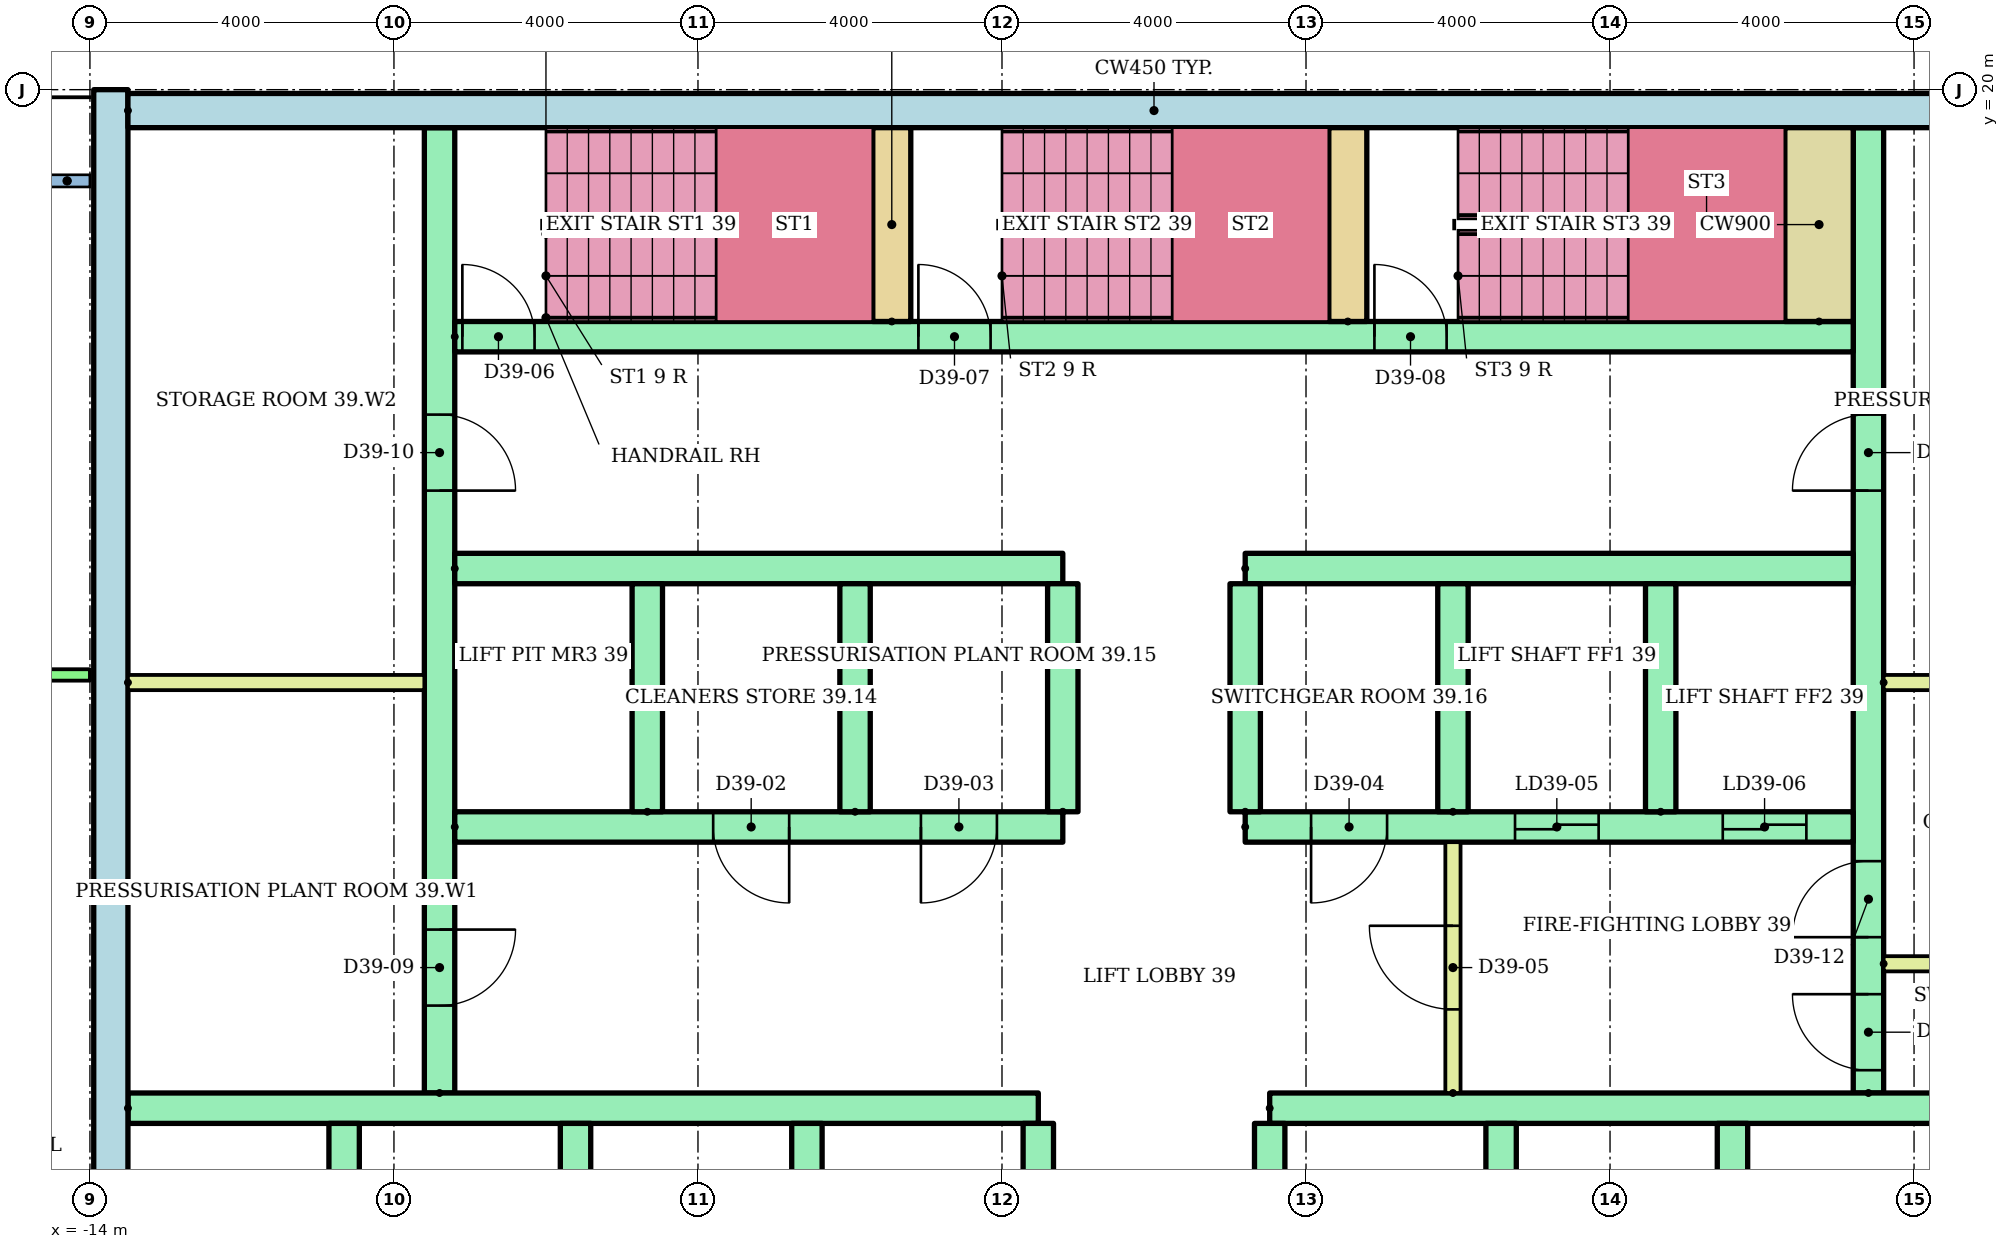
"""IFC4 building model, lengths in metres.
Left out: names, types, materials, properties, quantities, classifications, styles, units other than length and angle.
Written with IfcOpenShell. Run it as: python <this file> out.ifc"""

import sys

from ifc_helpers import new_model, si_unit, direction, frame, frame_2d, origin, place, context, subcontext, project, spatial, rectangle, extrude, element, fill, save


model = new_model("IFC4")
c1 = context("Model", 3, precision=1e-05, world=origin(), true_north=direction((0.0, 1.0)))
c2 = subcontext(c1, "Body", "Model", "MODEL_VIEW")
j1 = project(units=[si_unit("LENGTHUNIT", "METRE"), si_unit("PLANEANGLEUNIT", "RADIAN")], contexts=[c1])
p1 = place(None, origin())
s1 = spatial("IfcSite", under=j1, at=p1, CompositionType="ELEMENT")
p2 = place(p1, origin())
s2 = spatial("IfcBuilding", under=s1, at=p2, CompositionType="ELEMENT")
p3 = place(p2, frame((0.0, 0.0, 148.6)))
s3 = spatial("IfcBuildingStorey", under=s2, at=p3, CompositionType="ELEMENT", Elevation=148.6)
p4 = place(p3, frame((-13.725, 3.0, 0.0), z_axis=(0.0, 0.0, 1.0), x_axis=(0.0, 1.0, 0.0)))
e1 = element("IfcWall", 1, at=p4, inside=s3, PredefinedType="SHEAR", context=c2, shape_type="SweptSolid", body=[
    extrude(rectangle(XDim=17.0, YDim=0.45, at=frame_2d((8.5, 0.0))), origin(), (0.0, 0.0, 1.0), 2.8),
])
p5 = place(p3, frame((-13.5, 19.725, 0.0)))
e2 = element("IfcWall", 2, at=p5, inside=s3, PredefinedType="SHEAR", context=c2, shape_type="SweptSolid", body=[
    extrude(rectangle(XDim=27.0, YDim=0.45, at=frame_2d((13.5, 0.0))), origin(), (0.0, 0.0, 1.0), 2.8),
])
p6 = place(p3, frame((-9.4, 6.8, 0.0), z_axis=(0.0, 0.0, 1.0), x_axis=(0.0, 1.0, 0.0)))
e3 = element("IfcWall", 3, at=p6, inside=s3, PredefinedType="SHEAR", context=c2, shape_type="SweptSolid", body=[
    extrude(rectangle(XDim=12.7, YDim=0.4, at=frame_2d((6.35, 0.0))), origin(), (0.0, 0.0, 1.0), 2.8),
])
p7 = place(p6, frame((1.15, 0.0, 0.0)))
e4 = element("IfcOpeningElement", 4, at=p7, cuts=e3, PredefinedType="OPENING", context=c2, shape_type="SweptSolid", body=[
    extrude(rectangle(XDim=1.0, YDim=2.1, at=frame_2d((0.5, 1.05))), frame((0.0, 0.21, 0.0), z_axis=(0.0, -1.0, 0.0), x_axis=(1.0, 0.0, 0.0)), (0.0, 0.0, 1.0), 0.42),
])
p8 = place(p6, frame((7.925, 0.0, 0.0)))
e5 = element("IfcOpeningElement", 5, at=p8, cuts=e3, PredefinedType="OPENING", context=c2, shape_type="SweptSolid", body=[
    extrude(rectangle(XDim=1.0, YDim=2.1, at=frame_2d((0.5, 1.05))), frame((0.0, 0.21, 0.0), z_axis=(0.0, -1.0, 0.0), x_axis=(1.0, 0.0, 0.0)), (0.0, 0.0, 1.0), 0.42),
])
p9 = place(p3, frame((9.4, 6.8, 0.0), z_axis=(0.0, 0.0, 1.0), x_axis=(0.0, 1.0, 0.0)))
e6 = element("IfcWall", 6, at=p9, inside=s3, PredefinedType="SHEAR", context=c2, shape_type="SweptSolid", body=[
    extrude(rectangle(XDim=12.7, YDim=0.4, at=frame_2d((6.35, 0.0))), origin(), (0.0, 0.0, 1.0), 2.8),
])
p10 = place(p9, frame((0.3, 0.0, 0.0)))
e7 = element("IfcOpeningElement", 7, at=p10, cuts=e6, PredefinedType="OPENING", context=c2, shape_type="SweptSolid", body=[
    extrude(rectangle(XDim=1.0, YDim=2.1, at=frame_2d((0.5, 1.05))), frame((0.0, 0.21, 0.0), z_axis=(0.0, -1.0, 0.0), x_axis=(1.0, 0.0, 0.0)), (0.0, 0.0, 1.0), 0.42),
])
p11 = place(p9, frame((2.05, 0.0, 0.0)))
e8 = element("IfcOpeningElement", 8, at=p11, cuts=e6, PredefinedType="OPENING", context=c2, shape_type="SweptSolid", body=[
    extrude(rectangle(XDim=1.0, YDim=2.1, at=frame_2d((0.5, 1.05))), frame((0.0, 0.21, 0.0), z_axis=(0.0, -1.0, 0.0), x_axis=(1.0, 0.0, 0.0)), (0.0, 0.0, 1.0), 0.42),
])
p12 = place(p9, frame((7.925, 0.0, 0.0)))
e9 = element("IfcOpeningElement", 9, at=p12, cuts=e6, PredefinedType="OPENING", context=c2, shape_type="SweptSolid", body=[
    extrude(rectangle(XDim=1.0, YDim=2.1, at=frame_2d((0.5, 1.05))), frame((0.0, 0.21, 0.0), z_axis=(0.0, -1.0, 0.0), x_axis=(1.0, 0.0, 0.0)), (0.0, 0.0, 1.0), 0.42),
])
for number, where in (
    (10, (-13.5, 6.6, 0.0)),
    (11, (1.522, 6.6, 0.0)),
):
    element("IfcWall", number, at=place(p3, frame(where)), inside=s3, PredefinedType="SHEAR", context=c2, shape_type="SweptSolid", body=[
        extrude(rectangle(XDim=11.978, YDim=0.4, at=frame_2d((5.989, 0.0))), origin(), (0.0, 0.0, 1.0), 2.8),
    ])
for number, where, z_axis, x_axis in (
    (12, (-10.656, 3.4, 0.0), (0.0, 0.0, 1.0), (0.0, 1.0, 0.0)),
    (13, (-7.611, 3.4, 0.0), (0.0, 0.0, 1.0), (0.0, 1.0, 0.0)),
    (14, (-4.567, 3.4, 0.0), (0.0, 0.0, 1.0), (0.0, 1.0, 0.0)),
    (15, (-1.522, 3.4, 0.0), (0.0, 0.0, 1.0), (0.0, 1.0, 0.0)),
    (16, (1.522, 3.4, 0.0), (0.0, 0.0, 1.0), (0.0, 1.0, 0.0)),
    (17, (4.567, 3.4, 0.0), (0.0, 0.0, 1.0), (0.0, 1.0, 0.0)),
    (18, (7.611, 3.4, 0.0), (0.0, 0.0, 1.0), (0.0, 1.0, 0.0)),
):
    element("IfcWall", number, at=place(p3, frame(where, z_axis=z_axis, x_axis=x_axis)), inside=s3, PredefinedType="SHEAR", context=c2, shape_type="SweptSolid", body=[
        extrude(rectangle(XDim=3.0, YDim=0.4, at=frame_2d((1.5, 0.0))), origin(), (0.0, 0.0, 1.0), 2.8),
    ])
p13 = place(p3, frame((-9.2, 10.3, 0.0)))
e19 = element("IfcWall", 19, at=p13, inside=s3, PredefinedType="SHEAR", context=c2, shape_type="SweptSolid", body=[
    extrude(rectangle(XDim=8.0, YDim=0.4, at=frame_2d((4.0, 0.0))), origin(), (0.0, 0.0, 1.0), 2.8),
])
p14 = place(p13, frame((3.4, 0.0, 0.0)))
e20 = element("IfcOpeningElement", 20, at=p14, cuts=e19, PredefinedType="OPENING", context=c2, shape_type="SweptSolid", body=[
    extrude(rectangle(XDim=1.0, YDim=2.1, at=frame_2d((0.5, 1.05))), frame((0.0, 0.21, 0.0), z_axis=(0.0, -1.0, 0.0), x_axis=(1.0, 0.0, 0.0)), (0.0, 0.0, 1.0), 0.42),
])
p15 = place(p13, frame((6.133, 0.0, 0.0)))
e21 = element("IfcOpeningElement", 21, at=p15, cuts=e19, PredefinedType="OPENING", context=c2, shape_type="SweptSolid", body=[
    extrude(rectangle(XDim=1.0, YDim=2.1, at=frame_2d((0.5, 1.05))), frame((0.0, 0.21, 0.0), z_axis=(0.0, -1.0, 0.0), x_axis=(1.0, 0.0, 0.0)), (0.0, 0.0, 1.0), 0.42),
])
p16 = place(p3, frame((-9.2, 13.7, 0.0)))
e22 = element("IfcWall", 22, at=p16, inside=s3, PredefinedType="SHEAR", context=c2, shape_type="SweptSolid", body=[
    extrude(rectangle(XDim=8.0, YDim=0.4, at=frame_2d((4.0, 0.0))), origin(), (0.0, 0.0, 1.0), 2.8),
])
p17 = place(p3, frame((1.2, 10.3, 0.0)))
e23 = element("IfcWall", 23, at=p17, inside=s3, PredefinedType="SHEAR", context=c2, shape_type="SweptSolid", body=[
    extrude(rectangle(XDim=8.0, YDim=0.4, at=frame_2d((4.0, 0.0))), origin(), (0.0, 0.0, 1.0), 2.8),
])
p18 = place(p17, frame((3.55, 0.0, 0.0)))
e24 = element("IfcOpeningElement", 24, at=p18, cuts=e23, PredefinedType="OPENING", context=c2, shape_type="SweptSolid", body=[
    extrude(rectangle(XDim=1.1, YDim=2.1, at=frame_2d((0.55, 1.05))), frame((0.0, 0.21, 0.0), z_axis=(0.0, -1.0, 0.0), x_axis=(1.0, 0.0, 0.0)), (0.0, 0.0, 1.0), 0.42),
])
p19 = place(p17, frame((6.283, 0.0, 0.0)))
e25 = element("IfcOpeningElement", 25, at=p19, cuts=e23, PredefinedType="OPENING", context=c2, shape_type="SweptSolid", body=[
    extrude(rectangle(XDim=1.1, YDim=2.1, at=frame_2d((0.55, 1.05))), frame((0.0, 0.21, 0.0), z_axis=(0.0, -1.0, 0.0), x_axis=(1.0, 0.0, 0.0)), (0.0, 0.0, 1.0), 0.42),
])
p20 = place(p17, frame((0.867, 0.0, 0.0)))
e26 = element("IfcOpeningElement", 26, at=p20, cuts=e23, PredefinedType="OPENING", context=c2, shape_type="SweptSolid", body=[
    extrude(rectangle(XDim=1.0, YDim=2.1, at=frame_2d((0.5, 1.05))), frame((0.0, 0.21, 0.0), z_axis=(0.0, -1.0, 0.0), x_axis=(1.0, 0.0, 0.0)), (0.0, 0.0, 1.0), 0.42),
])
p21 = place(p3, frame((1.2, 13.7, 0.0)))
e27 = element("IfcWall", 27, at=p21, inside=s3, PredefinedType="SHEAR", context=c2, shape_type="SweptSolid", body=[
    extrude(rectangle(XDim=8.0, YDim=0.4, at=frame_2d((4.0, 0.0))), origin(), (0.0, 0.0, 1.0), 2.8),
])
for number, where, z_axis, x_axis in (
    (28, (-6.667, 10.5, 0.0), (0.0, 0.0, 1.0), (0.0, 1.0, 0.0)),
    (29, (-3.933, 10.5, 0.0), (0.0, 0.0, 1.0), (0.0, 1.0, 0.0)),
    (30, (-1.2, 10.5, 0.0), (0.0, 0.0, 1.0), (0.0, 1.0, 0.0)),
    (31, (1.2, 10.5, 0.0), (0.0, 0.0, 1.0), (0.0, 1.0, 0.0)),
    (32, (3.933, 10.5, 0.0), (0.0, 0.0, 1.0), (0.0, 1.0, 0.0)),
    (33, (6.667, 10.5, 0.0), (0.0, 0.0, 1.0), (0.0, 1.0, 0.0)),
):
    element("IfcWall", number, at=place(p3, frame(where, z_axis=z_axis, x_axis=x_axis)), inside=s3, PredefinedType="SHEAR", context=c2, shape_type="SweptSolid", body=[
        extrude(rectangle(XDim=3.0, YDim=0.4, at=frame_2d((1.5, 0.0))), origin(), (0.0, 0.0, 1.0), 2.8),
    ])
p22 = place(p3, frame((3.933, 6.8, 0.0), z_axis=(0.0, 0.0, 1.0), x_axis=(0.0, 1.0, 0.0)))
e34 = element("IfcWall", 34, at=p22, inside=s3, PredefinedType="PARTITIONING", context=c2, shape_type="SweptSolid", body=[
    extrude(rectangle(XDim=3.3, YDim=0.2, at=frame_2d((1.65, 0.0))), origin(), (0.0, 0.0, 1.0), 2.8),
])
p23 = place(p22, frame((1.1, 0.0, 0.0)))
e35 = element("IfcOpeningElement", 35, at=p23, cuts=e34, PredefinedType="OPENING", context=c2, shape_type="SweptSolid", body=[
    extrude(rectangle(XDim=1.1, YDim=2.1, at=frame_2d((0.55, 1.05))), frame((0.0, 0.11, 0.0), z_axis=(0.0, -1.0, 0.0), x_axis=(1.0, 0.0, 0.0)), (0.0, 0.0, 1.0), 0.22),
])
p24 = place(p3, frame((-9.2, 16.75, 0.0)))
e36 = element("IfcWall", 36, at=p24, inside=s3, PredefinedType="SHEAR", context=c2, shape_type="SweptSolid", body=[
    extrude(rectangle(XDim=18.4, YDim=0.4, at=frame_2d((9.2, 0.0))), origin(), (0.0, 0.0, 1.0), 2.8),
])
p25 = place(p24, frame((0.1, 0.0, 0.0)))
e37 = element("IfcOpeningElement", 37, at=p25, cuts=e36, PredefinedType="OPENING", context=c2, shape_type="SweptSolid", body=[
    extrude(rectangle(XDim=0.95, YDim=2.1, at=frame_2d((0.475, 1.05))), frame((0.0, 0.21, 0.0), z_axis=(0.0, -1.0, 0.0), x_axis=(1.0, 0.0, 0.0)), (0.0, 0.0, 1.0), 0.42),
])
p26 = place(p24, frame((6.1, 0.0, 0.0)))
e38 = element("IfcOpeningElement", 38, at=p26, cuts=e36, PredefinedType="OPENING", context=c2, shape_type="SweptSolid", body=[
    extrude(rectangle(XDim=0.95, YDim=2.1, at=frame_2d((0.475, 1.05))), frame((0.0, 0.21, 0.0), z_axis=(0.0, -1.0, 0.0), x_axis=(1.0, 0.0, 0.0)), (0.0, 0.0, 1.0), 0.42),
])
p27 = place(p24, frame((12.1, 0.0, 0.0)))
e39 = element("IfcOpeningElement", 39, at=p27, cuts=e36, PredefinedType="OPENING", context=c2, shape_type="SweptSolid", body=[
    extrude(rectangle(XDim=0.95, YDim=2.1, at=frame_2d((0.475, 1.05))), frame((0.0, 0.21, 0.0), z_axis=(0.0, -1.0, 0.0), x_axis=(1.0, 0.0, 0.0)), (0.0, 0.0, 1.0), 0.42),
])
for number, where, z_axis, x_axis in (
    (40, (-3.45, 16.95, 0.0), (0.0, 0.0, 1.0), (0.0, 1.0, 0.0)),
    (41, (2.55, 16.95, 0.0), (0.0, 0.0, 1.0), (0.0, 1.0, 0.0)),
):
    element("IfcWall", number, at=place(p3, frame(where, z_axis=z_axis, x_axis=x_axis)), inside=s3, PredefinedType="SHEAR", context=c2, shape_type="SweptSolid", body=[
        extrude(rectangle(XDim=2.55, YDim=0.5, at=frame_2d((1.275, 0.0))), origin(), (0.0, 0.0, 1.0), 2.8),
    ])
p28 = place(p3, frame((8.75, 16.95, 0.0), z_axis=(0.0, 0.0, 1.0), x_axis=(0.0, 1.0, 0.0)))
e42 = element("IfcWall", 42, at=p28, inside=s3, PredefinedType="SHEAR", context=c2, shape_type="SweptSolid", body=[
    extrude(rectangle(XDim=2.55, YDim=0.9, at=frame_2d((1.275, 0.0))), origin(), (0.0, 0.0, 1.0), 2.8),
])
for number, where in (
    (43, (-13.5, 12.2, 0.0)),
    (44, (9.6, 8.5, 0.0)),
    (45, (9.6, 12.2, 0.0)),
):
    element("IfcWall", number, at=place(p3, frame(where)), inside=s3, PredefinedType="PARTITIONING", context=c2, shape_type="SweptSolid", body=[
        extrude(rectangle(XDim=3.9, YDim=0.2, at=frame_2d((1.95, 0.0))), origin(), (0.0, 0.0, 1.0), 2.8),
    ])
p29 = place(p3, frame((-22.0, 12.3, 0.0)))
e46 = element("IfcWall", 46, at=p29, inside=s3, PredefinedType="PARTITIONING", context=c2, shape_type="SweptSolid", body=[
    extrude(rectangle(XDim=8.0, YDim=0.15, at=frame_2d((4.0, 0.0))), origin(), (0.0, 0.0, 1.0), 2.4),
])
p30 = place(p29, frame((3.5, 0.0, 0.0)))
e47 = element("IfcOpeningElement", 47, at=p30, cuts=e46, PredefinedType="OPENING", context=c2, shape_type="SweptSolid", body=[
    extrude(rectangle(XDim=1.0, YDim=2.1, at=frame_2d((0.5, 1.05))), frame((0.0, 0.085, 0.0), z_axis=(0.0, -1.0, 0.0), x_axis=(1.0, 0.0, 0.0)), (0.0, 0.0, 1.0), 0.17),
])
p31 = place(p18, origin())
e48 = element("IfcDoor", 48, at=p31, inside=s3, OperationType="SLIDING_TO_LEFT", PredefinedType="DOOR", context=c2, shape_type="SweptSolid", body=[
    extrude(rectangle(XDim=1.1, YDim=2.1, at=frame_2d((0.55, 1.05))), frame((0.0, 0.025, 0.0), z_axis=(0.0, -1.0, 0.0), x_axis=(1.0, 0.0, 0.0)), (0.0, 0.0, 1.0), 0.05),
])
fill(e24, e48)
p32 = place(p19, origin())
e49 = element("IfcDoor", 49, at=p32, inside=s3, OperationType="SLIDING_TO_LEFT", PredefinedType="DOOR", context=c2, shape_type="SweptSolid", body=[
    extrude(rectangle(XDim=1.1, YDim=2.1, at=frame_2d((0.55, 1.05))), frame((0.0, 0.025, 0.0), z_axis=(0.0, -1.0, 0.0), x_axis=(1.0, 0.0, 0.0)), (0.0, 0.0, 1.0), 0.05),
])
fill(e25, e49)
p33 = place(p14, frame((1.0, 0.0, 0.0), z_axis=(0.0, 0.0, 1.0), x_axis=(-1.0, 0.0, 0.0)))
e50 = element("IfcDoor", 50, at=p33, inside=s3, OperationType="SINGLE_SWING_RIGHT", PredefinedType="DOOR", context=c2, shape_type="SweptSolid", body=[
    extrude(rectangle(XDim=1.0, YDim=2.1, at=frame_2d((0.5, 1.05))), frame((0.0, 0.025, 0.0), z_axis=(0.0, -1.0, 0.0), x_axis=(1.0, 0.0, 0.0)), (0.0, 0.0, 1.0), 0.05),
])
fill(e20, e50)
p34 = place(p15, frame((1.0, 0.0, 0.0), z_axis=(0.0, 0.0, 1.0), x_axis=(-1.0, 0.0, 0.0)))
e51 = element("IfcDoor", 51, at=p34, inside=s3, OperationType="SINGLE_SWING_LEFT", PredefinedType="DOOR", context=c2, shape_type="SweptSolid", body=[
    extrude(rectangle(XDim=1.0, YDim=2.1, at=frame_2d((0.5, 1.05))), frame((0.0, 0.025, 0.0), z_axis=(0.0, -1.0, 0.0), x_axis=(1.0, 0.0, 0.0)), (0.0, 0.0, 1.0), 0.05),
])
fill(e21, e51)
p35 = place(p20, frame((1.0, 0.0, 0.0), z_axis=(0.0, 0.0, 1.0), x_axis=(-1.0, 0.0, 0.0)))
e52 = element("IfcDoor", 52, at=p35, inside=s3, OperationType="SINGLE_SWING_LEFT", PredefinedType="DOOR", context=c2, shape_type="SweptSolid", body=[
    extrude(rectangle(XDim=1.0, YDim=2.1, at=frame_2d((0.5, 1.05))), frame((0.0, 0.025, 0.0), z_axis=(0.0, -1.0, 0.0), x_axis=(1.0, 0.0, 0.0)), (0.0, 0.0, 1.0), 0.05),
])
fill(e26, e52)
p36 = place(p23, origin())
e53 = element("IfcDoor", 53, at=p36, inside=s3, OperationType="SINGLE_SWING_RIGHT", PredefinedType="DOOR", context=c2, shape_type="SweptSolid", body=[
    extrude(rectangle(XDim=1.1, YDim=2.1, at=frame_2d((0.55, 1.05))), frame((0.0, 0.025, 0.0), z_axis=(0.0, -1.0, 0.0), x_axis=(1.0, 0.0, 0.0)), (0.0, 0.0, 1.0), 0.05),
])
fill(e35, e53)
p37 = place(p25, origin())
e54 = element("IfcDoor", 54, at=p37, inside=s3, OperationType="SINGLE_SWING_LEFT", PredefinedType="DOOR", context=c2, shape_type="SweptSolid", body=[
    extrude(rectangle(XDim=0.95, YDim=2.1, at=frame_2d((0.475, 1.05))), frame((0.0, 0.025, 0.0), z_axis=(0.0, -1.0, 0.0), x_axis=(1.0, 0.0, 0.0)), (0.0, 0.0, 1.0), 0.05),
])
fill(e37, e54)
p38 = place(p26, origin())
e55 = element("IfcDoor", 55, at=p38, inside=s3, OperationType="SINGLE_SWING_LEFT", PredefinedType="DOOR", context=c2, shape_type="SweptSolid", body=[
    extrude(rectangle(XDim=0.95, YDim=2.1, at=frame_2d((0.475, 1.05))), frame((0.0, 0.025, 0.0), z_axis=(0.0, -1.0, 0.0), x_axis=(1.0, 0.0, 0.0)), (0.0, 0.0, 1.0), 0.05),
])
fill(e38, e55)
p39 = place(p27, origin())
e56 = element("IfcDoor", 56, at=p39, inside=s3, OperationType="SINGLE_SWING_LEFT", PredefinedType="DOOR", context=c2, shape_type="SweptSolid", body=[
    extrude(rectangle(XDim=0.95, YDim=2.1, at=frame_2d((0.475, 1.05))), frame((0.0, 0.025, 0.0), z_axis=(0.0, -1.0, 0.0), x_axis=(1.0, 0.0, 0.0)), (0.0, 0.0, 1.0), 0.05),
])
fill(e39, e56)
p40 = place(p7, frame((1.0, 0.0, 0.0), z_axis=(0.0, 0.0, 1.0), x_axis=(-1.0, 0.0, 0.0)))
e57 = element("IfcDoor", 57, at=p40, inside=s3, OperationType="SINGLE_SWING_RIGHT", PredefinedType="DOOR", context=c2, shape_type="SweptSolid", body=[
    extrude(rectangle(XDim=1.0, YDim=2.1, at=frame_2d((0.5, 1.05))), frame((0.0, 0.025, 0.0), z_axis=(0.0, -1.0, 0.0), x_axis=(1.0, 0.0, 0.0)), (0.0, 0.0, 1.0), 0.05),
])
fill(e4, e57)
p41 = place(p8, frame((1.0, 0.0, 0.0), z_axis=(0.0, 0.0, 1.0), x_axis=(-1.0, 0.0, 0.0)))
e58 = element("IfcDoor", 58, at=p41, inside=s3, OperationType="SINGLE_SWING_LEFT", PredefinedType="DOOR", context=c2, shape_type="SweptSolid", body=[
    extrude(rectangle(XDim=1.0, YDim=2.1, at=frame_2d((0.5, 1.05))), frame((0.0, 0.025, 0.0), z_axis=(0.0, -1.0, 0.0), x_axis=(1.0, 0.0, 0.0)), (0.0, 0.0, 1.0), 0.05),
])
fill(e5, e58)
p42 = place(p10, origin())
e59 = element("IfcDoor", 59, at=p42, inside=s3, OperationType="SINGLE_SWING_RIGHT", PredefinedType="DOOR", context=c2, shape_type="SweptSolid", body=[
    extrude(rectangle(XDim=1.0, YDim=2.1, at=frame_2d((0.5, 1.05))), frame((0.0, 0.025, 0.0), z_axis=(0.0, -1.0, 0.0), x_axis=(1.0, 0.0, 0.0)), (0.0, 0.0, 1.0), 0.05),
])
fill(e7, e59)
p43 = place(p11, origin())
e60 = element("IfcDoor", 60, at=p43, inside=s3, OperationType="SINGLE_SWING_LEFT", PredefinedType="DOOR", context=c2, shape_type="SweptSolid", body=[
    extrude(rectangle(XDim=1.0, YDim=2.1, at=frame_2d((0.5, 1.05))), frame((0.0, 0.025, 0.0), z_axis=(0.0, -1.0, 0.0), x_axis=(1.0, 0.0, 0.0)), (0.0, 0.0, 1.0), 0.05),
])
fill(e8, e60)
p44 = place(p12, origin())
e61 = element("IfcDoor", 61, at=p44, inside=s3, OperationType="SINGLE_SWING_LEFT", PredefinedType="DOOR", context=c2, shape_type="SweptSolid", body=[
    extrude(rectangle(XDim=1.0, YDim=2.1, at=frame_2d((0.5, 1.05))), frame((0.0, 0.025, 0.0), z_axis=(0.0, -1.0, 0.0), x_axis=(1.0, 0.0, 0.0)), (0.0, 0.0, 1.0), 0.05),
])
fill(e9, e61)
save(model, sys.argv[1])
